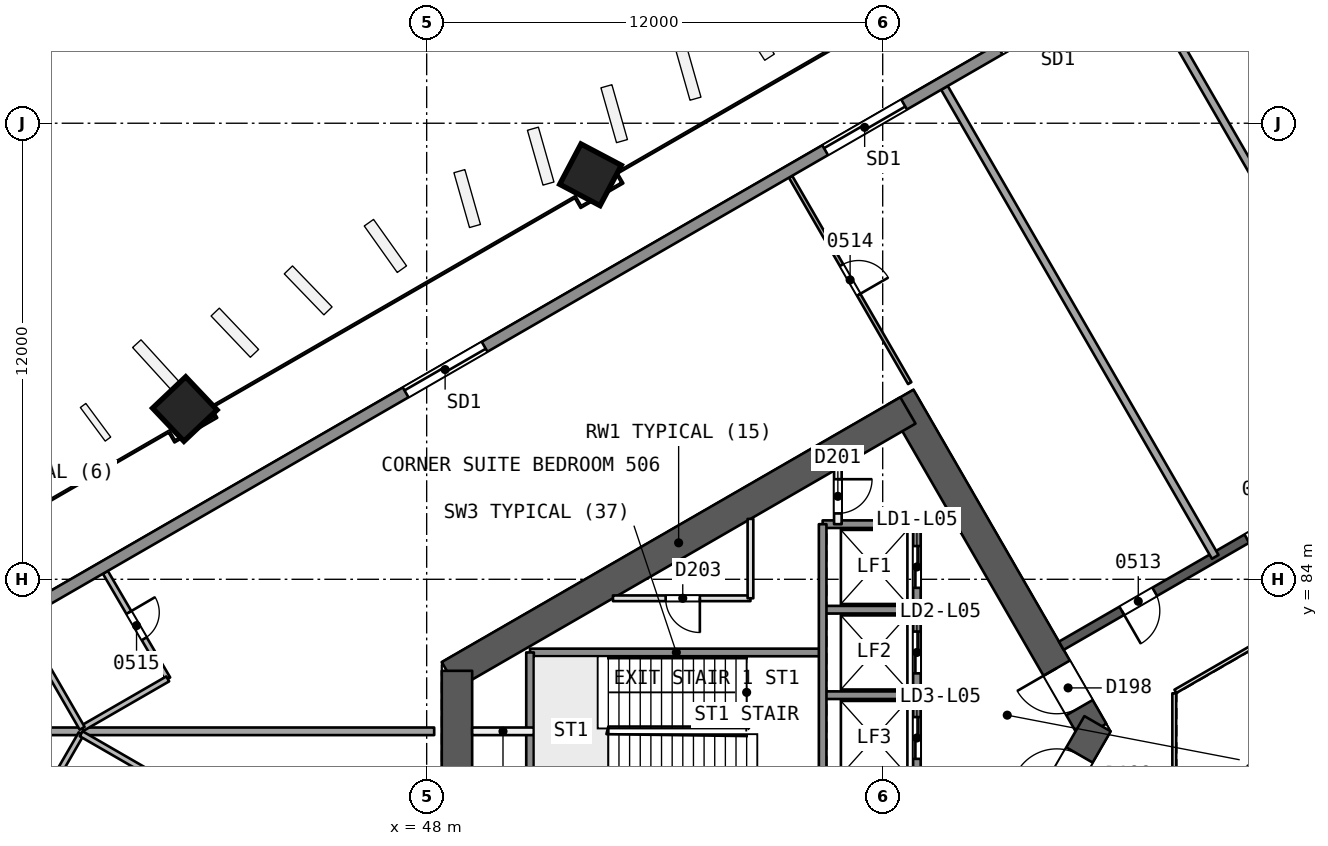
"""IFC4 building model, lengths in metres.
Left out: names, types, materials, properties, quantities, classifications, styles, units other than length and angle.
Written with IfcOpenShell. Run it as: python <this file> out.ifc"""

import sys

from ifc_helpers import new_model, si_unit, direction, frame, frame_2d, origin, origin_2d, place, context, subcontext, project, spatial, rectangle, extrude, element, fill, save


model = new_model("IFC4")
c1 = context("Model", 3, precision=1e-05, world=origin(), true_north=direction((0.0, 1.0)))
c2 = subcontext(c1, "Body", "Model", "MODEL_VIEW")
j1 = project(units=[si_unit("LENGTHUNIT", "METRE"), si_unit("PLANEANGLEUNIT", "RADIAN")], contexts=[c1])
p1 = place(None, origin())
s1 = spatial("IfcSite", under=j1, at=p1, CompositionType="ELEMENT")
p2 = place(p1, origin())
s2 = spatial("IfcBuilding", under=s1, at=p2, CompositionType="ELEMENT")
p3 = place(p2, frame((0.0, 0.0, 30.0)))
s3 = spatial("IfcBuildingStorey", under=s2, at=p3, CompositionType="ELEMENT", Elevation=30.0)
p4 = place(p3, frame((65.538, 80.0, 0.0), z_axis=(0.0, 0.0, 1.0), x_axis=(-0.49999662545, 0.866027352073, 0.0)))
e1 = element("IfcWall", 1, at=p4, inside=s3, PredefinedType="SHEAR", context=c2, shape_type="SweptSolid", body=[
    extrude(rectangle(XDim=10.149, YDim=0.8, at=frame_2d((5.074, 0.0))), origin(), (0.0, 0.0, 1.0), 3.7),
])
p5 = place(p4, frame((0.719, 0.0, 0.0)))
e2 = element("IfcOpeningElement", 2, at=p5, cuts=e1, PredefinedType="OPENING", context=c2, shape_type="SweptSolid", body=[
    extrude(rectangle(XDim=1.2, YDim=2.1, at=frame_2d((0.6, 1.05))), frame((0.0, 0.411, 0.0), z_axis=(0.0, -1.0, 0.0), x_axis=(1.0, 0.0, 0.0)), (0.0, 0.0, 1.0), 0.821),
])
p6 = place(p3, frame((60.664, 88.443, 0.0), z_axis=(0.0, 0.0, 1.0), x_axis=(-0.866029478545, -0.499992942241, 0.0)))
e3 = element("IfcWall", 3, at=p6, inside=s3, PredefinedType="SHEAR", context=c2, shape_type="SweptSolid", body=[
    extrude(rectangle(XDim=13.933, YDim=0.8, at=frame_2d((6.967, 0.0))), origin(), (0.0, 0.0, 1.0), 3.7),
])
p7 = place(p3, frame((48.797, 81.592, 0.0), z_axis=(0.0, 0.0, 1.0), x_axis=(0.0, -1.0, 0.0)))
e4 = element("IfcWall", 4, at=p7, inside=s3, PredefinedType="SHEAR", context=c2, shape_type="SweptSolid", body=[
    extrude(rectangle(XDim=3.415, YDim=0.8, at=frame_2d((1.707, 0.0))), origin(), (0.0, 0.0, 1.0), 3.7),
])
p8 = place(p3, frame((60.664, 71.557, 0.0), z_axis=(0.0, 0.0, 1.0), x_axis=(0.50000409368, 0.866023040284, 0.0)))
e5 = element("IfcWall", 5, at=p8, inside=s3, PredefinedType="SHEAR", context=c2, shape_type="SweptSolid", body=[
    extrude(rectangle(XDim=9.98, YDim=0.8, at=frame_2d((4.99, 0.0))), origin(), (0.0, 0.0, 1.0), 3.7),
])
p9 = place(p8, frame((7.83, 0.0, 0.0)))
e6 = element("IfcOpeningElement", 6, at=p9, cuts=e5, PredefinedType="OPENING", context=c2, shape_type="SweptSolid", body=[
    extrude(rectangle(XDim=1.2, YDim=2.1, at=frame_2d((0.6, 1.05))), frame((0.0, 0.411, 0.0), z_axis=(0.0, -1.0, 0.0), x_axis=(1.0, 0.0, 0.0)), (0.0, 0.0, 1.0), 0.821),
])
p10 = place(p3, frame((78.2, 90.046, 0.0), z_axis=(0.0, 0.0, 1.0), x_axis=(-0.866026492143, -0.499998114903, 0.0)))
e7 = element("IfcWall", 7, at=p10, inside=s3, PredefinedType="SHEAR", context=c2, shape_type="SweptSolid", body=[
    extrude(rectangle(XDim=15.588, YDim=0.25, at=frame_2d((7.794, 0.0))), origin(), (0.0, 0.0, 1.0), 3.2),
])
p11 = place(p10, frame((1.994, 0.0, 0.0)))
e8 = element("IfcOpeningElement", 8, at=p11, cuts=e7, PredefinedType="OPENING", context=c2, shape_type="SweptSolid", body=[
    extrude(rectangle(XDim=1.0, YDim=2.1, at=frame_2d((0.5, 1.05))), frame((0.0, 0.135, 0.0), z_axis=(0.0, -1.0, 0.0), x_axis=(1.0, 0.0, 0.0)), (0.0, 0.0, 1.0), 0.271),
])
p12 = place(p10, frame((8.85, 0.0, 0.0)))
e9 = element("IfcOpeningElement", 9, at=p12, cuts=e7, PredefinedType="OPENING", context=c2, shape_type="SweptSolid", body=[
    extrude(rectangle(XDim=1.1, YDim=2.1, at=frame_2d((0.55, 1.05))), frame((0.0, 0.135, 0.0), z_axis=(0.0, -1.0, 0.0), x_axis=(1.0, 0.0, 0.0)), (0.0, 0.0, 1.0), 0.271),
])
p13 = place(p10, frame((12.75, 0.0, 0.0)))
e10 = element("IfcOpeningElement", 10, at=p13, cuts=e7, PredefinedType="OPENING", context=c2, shape_type="SweptSolid", body=[
    extrude(rectangle(XDim=1.0, YDim=2.1, at=frame_2d((0.5, 1.05))), frame((0.0, 0.135, 0.0), z_axis=(0.0, -1.0, 0.0), x_axis=(1.0, 0.0, 0.0)), (0.0, 0.0, 1.0), 0.271),
])
p14 = place(p3, frame((52.288, 94.658, 0.0), z_axis=(0.019328516974, -0.012138044789, 0.999739504221), x_axis=(-0.500208848309, 0.865669585777, 0.020181088508)))
e11 = element("IfcColumn", 11, at=p14, inside=s3, PredefinedType="COLUMN", context=c2, shape_type="SweptSolid", body=[
    extrude(rectangle(XDim=1.2, YDim=1.2, at=origin_2d()), origin(), (0.0, 0.0, 1.0), 3.701),
])
p15 = place(p3, frame((41.601, 88.488, 0.0), z_axis=(0.02855911485, -0.006793507689, 0.999569019734), x_axis=(-0.500405785832, 0.865555785013, 0.020180003373)))
e12 = element("IfcColumn", 12, at=p15, inside=s3, PredefinedType="COLUMN", context=c2, shape_type="SweptSolid", body=[
    extrude(rectangle(XDim=1.2, YDim=1.2, at=origin_2d()), origin(), (0.0, 0.0, 1.0), 3.702),
])
for number, where, z_axis, x_axis in (
    (13, (66.754, 99.894, 0.0), (0.0, 0.0, 1.0), (0.5, -0.866, 0.0)),
    (14, (61.625, 96.932, 0.0), (0.0, 0.0, 1.0), (0.5, -0.866, 0.0)),
):
    element("IfcWall", number, at=place(p3, frame(where, z_axis=z_axis, x_axis=x_axis)), inside=s3, PredefinedType="PARTITIONING", context=c2, shape_type="SweptSolid", body=[
        extrude(rectangle(XDim=14.251, YDim=0.2, at=frame_2d((7.125, 0.0))), origin(), (0.0, 0.0, 1.0), 3.2),
    ])
p16 = place(p3, frame((57.574, 94.594, 0.0), z_axis=(0.0, 0.0, 1.0), x_axis=(0.499986391729, -0.866033260381, 0.0)))
e15 = element("IfcWall", 15, at=p16, inside=s3, PredefinedType="PARTITIONING", context=c2, shape_type="SweptSolid", body=[
    extrude(rectangle(XDim=6.272, YDim=0.1, at=frame_2d((3.136, 0.0))), origin(), (0.0, 0.0, 1.0), 3.2),
])
p17 = place(p16, frame((2.686, 0.0, 0.0)))
e16 = element("IfcOpeningElement", 16, at=p17, cuts=e15, PredefinedType="OPENING", context=c2, shape_type="SweptSolid", body=[
    extrude(rectangle(XDim=0.9, YDim=2.1, at=frame_2d((0.45, 1.05))), frame((0.0, 0.061, 0.0), z_axis=(0.0, -1.0, 0.0), x_axis=(1.0, 0.0, 0.0)), (0.0, 0.0, 1.0), 0.121),
])
p18 = place(p3, frame((39.545, 84.184, 0.0), z_axis=(0.0, 0.0, 1.0), x_axis=(0.505061816174, -0.863083172031, 0.0)))
e17 = element("IfcWall", 17, at=p18, inside=s3, PredefinedType="PARTITIONING", context=c2, shape_type="SweptSolid", body=[
    extrude(rectangle(XDim=3.249, YDim=0.15, at=frame_2d((1.625, 0.0))), origin(), (0.0, 0.0, 1.0), 3.2),
])
p19 = place(p18, frame((1.225, 0.0, 0.0)))
e18 = element("IfcOpeningElement", 18, at=p19, cuts=e17, PredefinedType="OPENING", context=c2, shape_type="SweptSolid", body=[
    extrude(rectangle(XDim=0.8, YDim=2.1, at=frame_2d((0.4, 1.05))), frame((0.0, 0.085, 0.0), z_axis=(0.0, -1.0, 0.0), x_axis=(1.0, 0.0, 0.0)), (0.0, 0.0, 1.0), 0.171),
])
p20 = place(p3, frame((41.186, 81.379, 0.0), z_axis=(0.0, 0.0, 1.0), x_axis=(-0.865997922154, -0.500047596559, 0.0)))
e19 = element("IfcWall", 19, at=p20, inside=s3, PredefinedType="PARTITIONING", context=c2, shape_type="SweptSolid", body=[
    extrude(rectangle(XDim=2.6, YDim=0.15, at=frame_2d((1.3, 0.0))), origin(), (0.0, 0.0, 1.0), 3.2),
])
p21 = place(p3, frame((38.934, 80.079, 0.0), z_axis=(0.0, 0.0, 1.0), x_axis=(-0.500019094464, 0.86601437931, 0.0)))
e20 = element("IfcWall", 20, at=p21, inside=s3, PredefinedType="PARTITIONING", context=c2, shape_type="SweptSolid", body=[
    extrude(rectangle(XDim=2.612, YDim=0.15, at=frame_2d((1.306, 0.0))), origin(), (0.0, 0.0, 1.0), 3.2),
])
p22 = place(p3, frame((37.628, 80.0, 0.0), z_axis=(0.0, 0.0, 1.0), x_axis=(1.0, 0.0, 0.0)))
e21 = element("IfcWall", 21, at=p22, inside=s3, PredefinedType="PARTITIONING", context=c2, shape_type="SweptSolid", body=[
    extrude(rectangle(XDim=10.57, YDim=0.2, at=frame_2d((5.285, 0.0))), origin(), (0.0, 0.0, 1.0), 3.2),
])
p23 = place(p3, frame((37.628, 77.718, 0.0), z_axis=(0.0, 0.0, 1.0), x_axis=(0.499953532967, 0.866052229876, 0.0)))
e22 = element("IfcWall", 22, at=p23, inside=s3, PredefinedType="PARTITIONING", context=c2, shape_type="SweptSolid", body=[
    extrude(rectangle(XDim=2.561, YDim=0.15, at=frame_2d((1.28, 0.0))), origin(), (0.0, 0.0, 1.0), 3.2),
])
p24 = place(p3, frame((38.908, 79.936, 0.0), z_axis=(0.0, 0.0, 1.0), x_axis=(0.866021400173, -0.500006934395, 0.0)))
e23 = element("IfcWall", 23, at=p24, inside=s3, PredefinedType="PARTITIONING", context=c2, shape_type="SweptSolid", body=[
    extrude(rectangle(XDim=2.6, YDim=0.15, at=frame_2d((1.3, 0.0))), origin(), (0.0, 0.0, 1.0), 3.2),
])
p25 = place(p3, frame((37.479, 83.163, 0.0), z_axis=(0.0, 0.0, 1.0), x_axis=(0.866024340432, 0.500001841776, 0.0)))
e24 = element("IfcWall", 24, at=p25, inside=s3, PredefinedType="SOLIDWALL", context=c2, shape_type="SweptSolid", body=[
    extrude(rectangle(XDim=61.824, YDim=0.3, at=frame_2d((30.912, 0.0))), origin(), (0.0, 0.0, 1.0), 3.2),
])
p26 = place(p25, frame((29.556, 0.0, 0.0)))
e25 = element("IfcOpeningElement", 25, at=p26, cuts=e24, PredefinedType="OPENING", context=c2, shape_type="SweptSolid", body=[
    extrude(rectangle(XDim=2.4, YDim=2.4, at=frame_2d((1.2, 1.2))), frame((0.0, 0.161, 0.0), z_axis=(0.0, -1.0, 0.0), x_axis=(1.0, 0.0, 0.0)), (0.0, 0.0, 1.0), 0.321),
])
p27 = place(p25, frame((35.012, 0.0, 0.0)))
e26 = element("IfcOpeningElement", 26, at=p27, cuts=e24, PredefinedType="OPENING", context=c2, shape_type="SweptSolid", body=[
    extrude(rectangle(XDim=2.4, YDim=2.4, at=frame_2d((1.2, 1.2))), frame((0.0, 0.161, 0.0), z_axis=(0.0, -1.0, 0.0), x_axis=(1.0, 0.0, 0.0)), (0.0, 0.0, 1.0), 0.321),
])
p28 = place(p25, frame((47.93, 0.0, 0.0)))
e27 = element("IfcOpeningElement", 27, at=p28, cuts=e24, PredefinedType="OPENING", context=c2, shape_type="SweptSolid", body=[
    extrude(rectangle(XDim=2.4, YDim=2.4, at=frame_2d((1.2, 1.2))), frame((0.0, 0.161, 0.0), z_axis=(0.0, -1.0, 0.0), x_axis=(1.0, 0.0, 0.0)), (0.0, 0.0, 1.0), 0.321),
])
p29 = place(p25, frame((24.256, 0.0, 0.0)))
e28 = element("IfcOpeningElement", 28, at=p29, cuts=e24, PredefinedType="OPENING", context=c2, shape_type="SweptSolid", body=[
    extrude(rectangle(XDim=2.4, YDim=2.4, at=frame_2d((1.2, 1.2))), frame((0.0, 0.161, 0.0), z_axis=(0.0, -1.0, 0.0), x_axis=(1.0, 0.0, 0.0)), (0.0, 0.0, 1.0), 0.321),
])
p30 = place(p25, frame((11.509, 0.0, 0.0)))
e29 = element("IfcOpeningElement", 29, at=p30, cuts=e24, PredefinedType="OPENING", context=c2, shape_type="SweptSolid", body=[
    extrude(rectangle(XDim=2.4, YDim=2.4, at=frame_2d((1.2, 1.2))), frame((0.0, 0.161, 0.0), z_axis=(0.0, -1.0, 0.0), x_axis=(1.0, 0.0, 0.0)), (0.0, 0.0, 1.0), 0.321),
])
p31 = place(p3, frame((60.9, 85.45, 0.0), z_axis=(0.0, 0.0, 1.0), x_axis=(-1.0, 0.0, 0.0)))
e30 = element("IfcWall", 30, at=p31, inside=s3, PredefinedType="SOLIDWALL", context=c2, shape_type="SweptSolid", body=[
    extrude(rectangle(XDim=2.48, YDim=0.2, at=frame_2d((1.24, 0.0))), origin(), (0.0, 0.0, 1.0), 3.2),
])
p32 = place(p3, frame((56.52, 83.5, 0.0), z_axis=(0.0, 0.0, 1.0), x_axis=(-1.0, 0.0, 0.0)))
e31 = element("IfcWall", 31, at=p32, inside=s3, PredefinedType="PARTITIONING", context=c2, shape_type="SweptSolid", body=[
    extrude(rectangle(XDim=3.618, YDim=0.15, at=frame_2d((1.809, 0.0))), origin(), (0.0, 0.0, 1.0), 3.2),
])
p33 = place(p32, frame((1.332, 0.0, 0.0)))
e32 = element("IfcOpeningElement", 32, at=p33, cuts=e31, PredefinedType="OPENING", context=c2, shape_type="SweptSolid", body=[
    extrude(rectangle(XDim=0.9, YDim=2.1, at=frame_2d((0.45, 1.05))), frame((0.0, 0.085, 0.0), z_axis=(0.0, -1.0, 0.0), x_axis=(1.0, 0.0, 0.0)), (0.0, 0.0, 1.0), 0.171),
])
p34 = place(p3, frame((60.9, 83.2, 0.0), z_axis=(0.0, 0.0, 1.0), x_axis=(-1.0, 0.0, 0.0)))
e33 = element("IfcWall", 33, at=p34, inside=s3, PredefinedType="SOLIDWALL", context=c2, shape_type="SweptSolid", body=[
    extrude(rectangle(XDim=2.48, YDim=0.2, at=frame_2d((1.24, 0.0))), origin(), (0.0, 0.0, 1.0), 3.2),
])
p35 = place(p3, frame((58.42, 82.075, 0.0), z_axis=(0.0, 0.0, 1.0), x_axis=(-1.0, 0.0, 0.0)))
e34 = element("IfcWall", 34, at=p35, inside=s3, PredefinedType="SOLIDWALL", context=c2, shape_type="SweptSolid", body=[
    extrude(rectangle(XDim=7.7, YDim=0.2, at=frame_2d((3.85, 0.0))), origin(), (0.0, 0.0, 1.0), 3.2),
])
p36 = place(p3, frame((60.9, 80.95, 0.0), z_axis=(0.0, 0.0, 1.0), x_axis=(-1.0, 0.0, 0.0)))
e35 = element("IfcWall", 35, at=p36, inside=s3, PredefinedType="SOLIDWALL", context=c2, shape_type="SweptSolid", body=[
    extrude(rectangle(XDim=2.48, YDim=0.2, at=frame_2d((1.24, 0.0))), origin(), (0.0, 0.0, 1.0), 3.2),
])
p37 = place(p3, frame((50.82, 80.0, 0.0), z_axis=(0.0, 0.0, 1.0), x_axis=(-1.0, 0.0, 0.0)))
e36 = element("IfcWall", 36, at=p37, inside=s3, PredefinedType="PARTITIONING", context=c2, shape_type="SweptSolid", body=[
    extrude(rectangle(XDim=1.623, YDim=0.2, at=frame_2d((0.812, 0.0))), origin(), (0.0, 0.0, 1.0), 3.2),
])
p38 = place(p3, frame((60.9, 85.45, 0.0), z_axis=(0.0, 0.0, 1.0), x_axis=(0.0, -1.0, 0.0)))
e37 = element("IfcWall", 37, at=p38, inside=s3, PredefinedType="SOLIDWALL", context=c2, shape_type="SweptSolid", body=[
    extrude(rectangle(XDim=10.9, YDim=0.2, at=frame_2d((5.45, 0.0))), origin(), (0.0, 0.0, 1.0), 3.2),
])
p39 = place(p38, frame((0.575, 0.0, 0.0)))
e38 = element("IfcOpeningElement", 38, at=p39, cuts=e37, PredefinedType="OPENING", context=c2, shape_type="SweptSolid", body=[
    extrude(rectangle(XDim=1.1, YDim=2.1, at=frame_2d((0.55, 1.05))), frame((0.0, 0.11, 0.0), z_axis=(0.0, -1.0, 0.0), x_axis=(1.0, 0.0, 0.0)), (0.0, 0.0, 1.0), 0.221),
])
p40 = place(p38, frame((2.825, 0.0, 0.0)))
e39 = element("IfcOpeningElement", 39, at=p40, cuts=e37, PredefinedType="OPENING", context=c2, shape_type="SweptSolid", body=[
    extrude(rectangle(XDim=1.1, YDim=2.1, at=frame_2d((0.55, 1.05))), frame((0.0, 0.11, 0.0), z_axis=(0.0, -1.0, 0.0), x_axis=(1.0, 0.0, 0.0)), (0.0, 0.0, 1.0), 0.221),
])
p41 = place(p38, frame((5.075, 0.0, 0.0)))
e40 = element("IfcOpeningElement", 40, at=p41, cuts=e37, PredefinedType="OPENING", context=c2, shape_type="SweptSolid", body=[
    extrude(rectangle(XDim=1.1, YDim=2.1, at=frame_2d((0.55, 1.05))), frame((0.0, 0.11, 0.0), z_axis=(0.0, -1.0, 0.0), x_axis=(1.0, 0.0, 0.0)), (0.0, 0.0, 1.0), 0.221),
])
p42 = place(p38, frame((7.325, 0.0, 0.0)))
e41 = element("IfcOpeningElement", 41, at=p42, cuts=e37, PredefinedType="OPENING", context=c2, shape_type="SweptSolid", body=[
    extrude(rectangle(XDim=1.1, YDim=2.1, at=frame_2d((0.55, 1.05))), frame((0.0, 0.11, 0.0), z_axis=(0.0, -1.0, 0.0), x_axis=(1.0, 0.0, 0.0)), (0.0, 0.0, 1.0), 0.221),
])
p43 = place(p3, frame((58.82, 86.917, 0.0), z_axis=(0.0, 0.0, 1.0), x_axis=(0.0, -1.0, 0.0)))
e42 = element("IfcWall", 42, at=p43, inside=s3, PredefinedType="PARTITIONING", context=c2, shape_type="SweptSolid", body=[
    extrude(rectangle(XDim=1.467, YDim=0.2, at=frame_2d((0.733, 0.0))), origin(), (0.0, 0.0, 1.0), 3.2),
])
p44 = place(p43, frame((0.283, 0.0, 0.0)))
e43 = element("IfcOpeningElement", 43, at=p44, cuts=e42, PredefinedType="OPENING", context=c2, shape_type="SweptSolid", body=[
    extrude(rectangle(XDim=0.9, YDim=2.1, at=frame_2d((0.45, 1.05))), frame((0.0, 0.11, 0.0), z_axis=(0.0, -1.0, 0.0), x_axis=(1.0, 0.0, 0.0)), (0.0, 0.0, 1.0), 0.221),
])
p45 = place(p3, frame((58.42, 85.45, 0.0), z_axis=(0.0, 0.0, 1.0), x_axis=(0.0, -1.0, 0.0)))
e44 = element("IfcWall", 44, at=p45, inside=s3, PredefinedType="SOLIDWALL", context=c2, shape_type="SweptSolid", body=[
    extrude(rectangle(XDim=9.0, YDim=0.2, at=frame_2d((4.5, 0.0))), origin(), (0.0, 0.0, 1.0), 3.2),
])
p46 = place(p3, frame((56.52, 85.589, 0.0), z_axis=(0.0, 0.0, 1.0), x_axis=(0.0, -1.0, 0.0)))
e45 = element("IfcWall", 45, at=p46, inside=s3, PredefinedType="PARTITIONING", context=c2, shape_type="SweptSolid", body=[
    extrude(rectangle(XDim=2.089, YDim=0.15, at=frame_2d((1.044, 0.0))), origin(), (0.0, 0.0, 1.0), 3.2),
])
p47 = place(p3, frame((50.72, 82.075, 0.0), z_axis=(0.0, 0.0, 1.0), x_axis=(0.0, -1.0, 0.0)))
e46 = element("IfcWall", 46, at=p47, inside=s3, PredefinedType="SOLIDWALL", context=c2, shape_type="SweptSolid", body=[
    extrude(rectangle(XDim=4.15, YDim=0.2, at=frame_2d((2.075, 0.0))), origin(), (0.0, 0.0, 1.0), 3.2),
])
p48 = place(p3, frame((77.738, 86.846, 0.0), z_axis=(0.0, 0.0, 1.0), x_axis=(-0.866026658274, -0.499997827154, 0.0)))
e47 = element("IfcWall", 47, at=p48, inside=s3, PredefinedType="PARTITIONING", context=c2, shape_type="SweptSolid", body=[
    extrude(rectangle(XDim=11.588, YDim=0.1, at=frame_2d((5.794, 0.0))), origin(), (0.0, 0.0, 1.0), 3.2),
])
p49 = place(p3, frame((67.672, 81.0, 0.0), z_axis=(0.0, 0.0, 1.0), x_axis=(0.0, -1.0, 0.0)))
e48 = element("IfcWall", 48, at=p49, inside=s3, PredefinedType="PARTITIONING", context=c2, shape_type="SweptSolid", body=[
    extrude(rectangle(XDim=2.0, YDim=0.1, at=frame_2d((1.0, 0.0))), origin(), (0.0, 0.0, 1.0), 3.2),
])
p50 = place(p12, origin())
e49 = element("IfcDoor", 49, at=p50, inside=s3, OperationType="SINGLE_SWING_RIGHT", PredefinedType="NOTDEFINED", context=c2, shape_type="SweptSolid", body=[
    extrude(rectangle(XDim=1.1, YDim=2.1, at=frame_2d((0.55, 1.05))), frame((0.0, 0.025, 0.0), z_axis=(0.0, -1.0, 0.0), x_axis=(1.0, 0.0, 0.0)), (0.0, 0.0, 1.0), 0.05),
])
fill(e9, e49)
p51 = place(p13, origin())
e50 = element("IfcDoor", 50, at=p51, inside=s3, OperationType="SINGLE_SWING_RIGHT", PredefinedType="NOTDEFINED", context=c2, shape_type="SweptSolid", body=[
    extrude(rectangle(XDim=1.0, YDim=2.1, at=frame_2d((0.5, 1.05))), frame((0.0, 0.025, 0.0), z_axis=(0.0, -1.0, 0.0), x_axis=(1.0, 0.0, 0.0)), (0.0, 0.0, 1.0), 0.05),
])
fill(e10, e50)
p52 = place(p17, origin())
e51 = element("IfcDoor", 51, at=p52, inside=s3, OperationType="SINGLE_SWING_RIGHT", PredefinedType="NOTDEFINED", context=c2, shape_type="SweptSolid", body=[
    extrude(rectangle(XDim=0.9, YDim=2.1, at=frame_2d((0.45, 1.05))), frame((0.0, 0.025, 0.0), z_axis=(0.0, -1.0, 0.0), x_axis=(1.0, 0.0, 0.0)), (0.0, 0.0, 1.0), 0.05),
])
fill(e16, e51)
p53 = place(p19, origin())
e52 = element("IfcDoor", 52, at=p53, inside=s3, OperationType="SINGLE_SWING_LEFT", PredefinedType="NOTDEFINED", context=c2, shape_type="SweptSolid", body=[
    extrude(rectangle(XDim=0.8, YDim=2.1, at=frame_2d((0.4, 1.05))), frame((0.0, 0.025, 0.0), z_axis=(0.0, -1.0, 0.0), x_axis=(1.0, 0.0, 0.0)), (0.0, 0.0, 1.0), 0.05),
])
fill(e18, e52)
p54 = place(p29, origin())
e53 = element("IfcDoor", 53, at=p54, inside=s3, OperationType="SLIDING_TO_RIGHT", PredefinedType="NOTDEFINED", context=c2, shape_type="SweptSolid", body=[
    extrude(rectangle(XDim=2.4, YDim=2.4, at=frame_2d((1.2, 1.2))), frame((0.0, 0.025, 0.0), z_axis=(0.0, -1.0, 0.0), x_axis=(1.0, 0.0, 0.0)), (0.0, 0.0, 1.0), 0.05),
])
fill(e28, e53)
p55 = place(p30, origin())
e54 = element("IfcDoor", 54, at=p55, inside=s3, OperationType="SLIDING_TO_LEFT", PredefinedType="NOTDEFINED", context=c2, shape_type="SweptSolid", body=[
    extrude(rectangle(XDim=2.4, YDim=2.4, at=frame_2d((1.2, 1.2))), frame((0.0, 0.025, 0.0), z_axis=(0.0, -1.0, 0.0), x_axis=(1.0, 0.0, 0.0)), (0.0, 0.0, 1.0), 0.05),
])
fill(e29, e54)
p56 = place(p5, origin())
e55 = element("IfcDoor", 55, at=p56, inside=s3, OperationType="SINGLE_SWING_RIGHT", PredefinedType="NOTDEFINED", context=c2, shape_type="SweptSolid", body=[
    extrude(rectangle(XDim=1.2, YDim=2.1, at=frame_2d((0.6, 1.05))), frame((0.0, 0.025, 0.0), z_axis=(0.0, -1.0, 0.0), x_axis=(1.0, 0.0, 0.0)), (0.0, 0.0, 1.0), 0.05),
])
fill(e2, e55)
p57 = place(p9, origin())
e56 = element("IfcDoor", 56, at=p57, inside=s3, OperationType="SINGLE_SWING_LEFT", PredefinedType="NOTDEFINED", context=c2, shape_type="SweptSolid", body=[
    extrude(rectangle(XDim=1.2, YDim=2.1, at=frame_2d((0.6, 1.05))), frame((0.0, 0.025, 0.0), z_axis=(0.0, -1.0, 0.0), x_axis=(1.0, 0.0, 0.0)), (0.0, 0.0, 1.0), 0.05),
])
fill(e6, e56)
p58 = place(p39, origin())
e57 = element("IfcDoor", 57, at=p58, inside=s3, OperationType="SLIDING_TO_RIGHT", PredefinedType="NOTDEFINED", context=c2, shape_type="SweptSolid", body=[
    extrude(rectangle(XDim=1.1, YDim=2.1, at=frame_2d((0.55, 1.05))), frame((0.0, 0.025, 0.0), z_axis=(0.0, -1.0, 0.0), x_axis=(1.0, 0.0, 0.0)), (0.0, 0.0, 1.0), 0.05),
])
fill(e38, e57)
p59 = place(p40, origin())
e58 = element("IfcDoor", 58, at=p59, inside=s3, OperationType="SLIDING_TO_LEFT", PredefinedType="NOTDEFINED", context=c2, shape_type="SweptSolid", body=[
    extrude(rectangle(XDim=1.1, YDim=2.1, at=frame_2d((0.55, 1.05))), frame((0.0, 0.025, 0.0), z_axis=(0.0, -1.0, 0.0), x_axis=(1.0, 0.0, 0.0)), (0.0, 0.0, 1.0), 0.05),
])
fill(e39, e58)
p60 = place(p41, origin())
e59 = element("IfcDoor", 59, at=p60, inside=s3, OperationType="SLIDING_TO_RIGHT", PredefinedType="NOTDEFINED", context=c2, shape_type="SweptSolid", body=[
    extrude(rectangle(XDim=1.1, YDim=2.1, at=frame_2d((0.55, 1.05))), frame((0.0, 0.025, 0.0), z_axis=(0.0, -1.0, 0.0), x_axis=(1.0, 0.0, 0.0)), (0.0, 0.0, 1.0), 0.05),
])
fill(e40, e59)
p61 = place(p44, origin())
e60 = element("IfcDoor", 60, at=p61, inside=s3, OperationType="SINGLE_SWING_LEFT", PredefinedType="NOTDEFINED", context=c2, shape_type="SweptSolid", body=[
    extrude(rectangle(XDim=0.9, YDim=2.1, at=frame_2d((0.45, 1.05))), frame((0.0, 0.025, 0.0), z_axis=(0.0, -1.0, 0.0), x_axis=(1.0, 0.0, 0.0)), (0.0, 0.0, 1.0), 0.05),
])
fill(e43, e60)
p62 = place(p33, origin())
e61 = element("IfcDoor", 61, at=p62, inside=s3, OperationType="SINGLE_SWING_LEFT", PredefinedType="NOTDEFINED", context=c2, shape_type="SweptSolid", body=[
    extrude(rectangle(XDim=0.9, YDim=2.1, at=frame_2d((0.45, 1.05))), frame((0.0, 0.025, 0.0), z_axis=(0.0, -1.0, 0.0), x_axis=(1.0, 0.0, 0.0)), (0.0, 0.0, 1.0), 0.05),
])
fill(e32, e61)
save(model, sys.argv[1])
